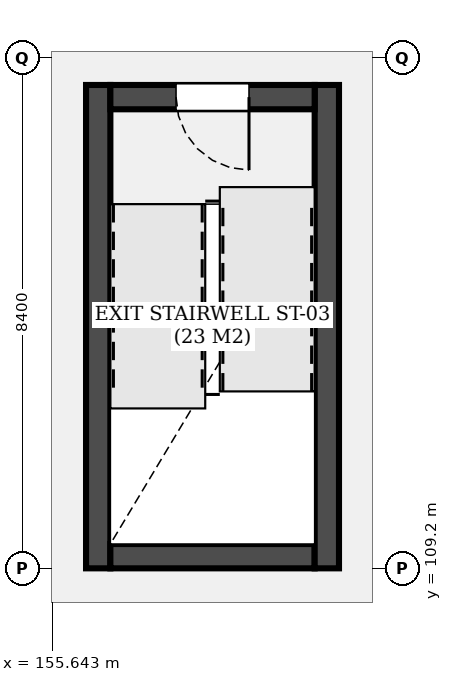
"""IFC4 building model, lengths in metres.
Left out: names, types, materials, properties, quantities, classifications, styles, units other than length and angle.
Written with IfcOpenShell. Run it as: python <this file> out.ifc"""

import sys

from ifc_helpers import new_model, si_unit, direction, frame, frame_2d, origin, place, context, subcontext, project, spatial, rectangle, extrude, element, fill, save


model = new_model("IFC4")
c1 = context("Model", 3, precision=1e-05, world=origin(), true_north=direction((0.0, 1.0)))
c2 = subcontext(c1, "Body", "Model", "MODEL_VIEW")
j1 = project(units=[si_unit("LENGTHUNIT", "METRE"), si_unit("PLANEANGLEUNIT", "RADIAN")], contexts=[c1])
p1 = place(None, origin())
s1 = spatial("IfcSite", under=j1, at=p1, CompositionType="ELEMENT")
p2 = place(p1, origin())
s2 = spatial("IfcBuilding", under=s1, at=p2, CompositionType="ELEMENT")
p3 = place(p2, frame((0.0, 0.0, 17.8)))
s3 = spatial("IfcBuildingStorey", under=s2, at=p3, CompositionType="ELEMENT", Elevation=17.8)
p4 = place(p3, frame((156.4, 117.15, 0.0), z_axis=(0.0, 0.0, 1.0), x_axis=(0.0, -1.0, 0.0)))
e1 = element("IfcWall", 1, at=p4, inside=s3, PredefinedType="SHEAR", context=c2, shape_type="SweptSolid", body=[
    extrude(rectangle(XDim=7.95, YDim=0.4, at=frame_2d((3.975, 0.0))), origin(), (0.0, 0.0, 1.0), 4.2),
])
p5 = place(p3, frame((156.6, 109.4, 0.0), z_axis=(0.0, 0.0, 1.0), x_axis=(1.0, 0.0, 0.0)))
e2 = element("IfcWall", 2, at=p5, inside=s3, PredefinedType="SHEAR", context=c2, shape_type="SweptSolid", body=[
    extrude(rectangle(XDim=3.36, YDim=0.4, at=frame_2d((1.68, 0.0))), origin(), (0.0, 0.0, 1.0), 4.2),
])
p6 = place(p3, frame((160.16, 109.2, 0.0), z_axis=(0.0, 0.0, 1.0), x_axis=(0.0, 1.0, 0.0)))
e3 = element("IfcWall", 3, at=p6, inside=s3, PredefinedType="SHEAR", context=c2, shape_type="SweptSolid", body=[
    extrude(rectangle(XDim=7.95, YDim=0.4, at=frame_2d((3.975, 0.0))), origin(), (0.0, 0.0, 1.0), 4.2),
])
p7 = place(p3, frame((159.96, 116.95, 0.0), z_axis=(0.0, 0.0, 1.0), x_axis=(-1.0, 0.0, 0.0)))
e4 = element("IfcWall", 4, at=p7, inside=s3, PredefinedType="SHEAR", context=c2, shape_type="SweptSolid", body=[
    extrude(rectangle(XDim=3.36, YDim=0.4, at=frame_2d((1.68, 0.0))), origin(), (0.0, 0.0, 1.0), 4.2),
])
p8 = place(p7, frame((1.08, 0.0, 0.0)))
e5 = element("IfcOpeningElement", 5, at=p8, cuts=e4, PredefinedType="OPENING", context=c2, shape_type="SweptSolid", body=[
    extrude(rectangle(XDim=1.2, YDim=2.2, at=frame_2d((0.6, 1.1))), frame((0.0, 0.21, 0.0), z_axis=(0.0, -1.0, 0.0), x_axis=(1.0, 0.0, 0.0)), (0.0, 0.0, 1.0), 0.42),
])
p9 = place(p8, origin())
e6 = element("IfcDoor", 6, at=p9, inside=s3, OperationType="SINGLE_SWING_LEFT", PredefinedType="DOOR", context=c2, shape_type="SweptSolid", body=[
    extrude(rectangle(XDim=1.2, YDim=2.2, at=frame_2d((0.6, 1.1))), frame((0.0, 0.025, 0.0), z_axis=(0.0, -1.0, 0.0), x_axis=(1.0, 0.0, 0.0)), (0.0, 0.0, 1.0), 0.05),
])
fill(e5, e6)
save(model, sys.argv[1])
